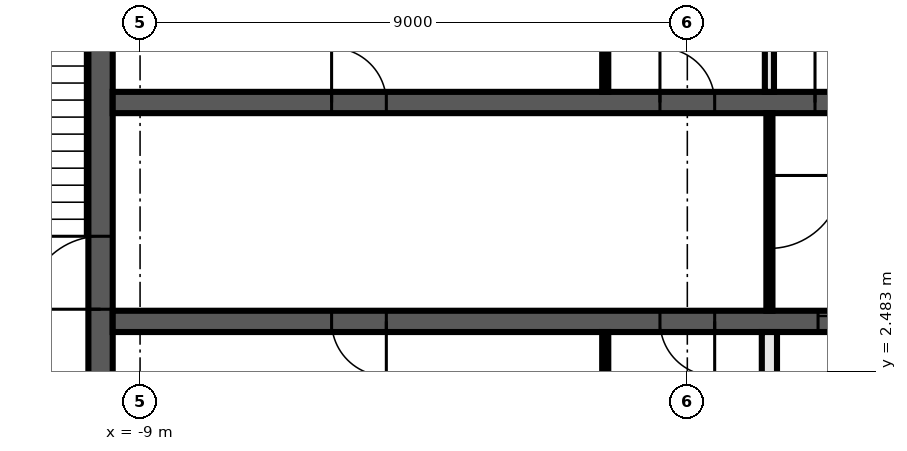
"""IFC4 building model, lengths in metres.
Left out: names, types, materials, properties, quantities, classifications, styles, units other than length and angle.
Written with IfcOpenShell. Run it as: python <this file> out.ifc"""

import sys

from ifc_helpers import new_model, si_unit, direction, frame, frame_2d, origin, place, context, subcontext, project, spatial, rectangle, extrude, element, fill, save


model = new_model("IFC4")
c1 = context("Model", 3, precision=1e-05, world=origin(), true_north=direction((0.0, 1.0)))
c2 = subcontext(c1, "Body", "Model", "MODEL_VIEW")
j1 = project(units=[si_unit("LENGTHUNIT", "METRE"), si_unit("PLANEANGLEUNIT", "RADIAN")], contexts=[c1])
p1 = place(None, origin())
s1 = spatial("IfcSite", under=j1, at=p1, CompositionType="ELEMENT")
p2 = place(p1, origin())
s2 = spatial("IfcBuilding", under=s1, at=p2, CompositionType="ELEMENT")
p3 = place(p2, frame((0.0, 0.0, 171.2)))
s3 = spatial("IfcBuildingStorey", under=s2, at=p3, CompositionType="ELEMENT", Elevation=171.2)
p4 = place(p3, frame((-9.65, 2.3, 0.0), z_axis=(0.0, 0.0, 1.0), x_axis=(0.0, 1.0, 0.0)))
e1 = element("IfcWall", 1, at=p4, inside=s3, PredefinedType="SHEAR", context=c2, shape_type="SweptSolid", body=[
    extrude(rectangle(XDim=7.5, YDim=0.4, at=frame_2d((3.75, 0.0))), origin(), (0.0, 0.0, 1.0), 3.82),
])
p5 = place(p4, frame((1.2, 0.0, 0.0)))
e2 = element("IfcOpeningElement", 2, at=p5, cuts=e1, PredefinedType="OPENING", context=c2, shape_type="SweptSolid", body=[
    extrude(rectangle(XDim=1.2, YDim=2.1, at=frame_2d((0.6, 1.05))), frame((0.0, 0.21, 0.0), z_axis=(0.0, -1.0, 0.0), x_axis=(1.0, 0.0, 0.0)), (0.0, 0.0, 1.0), 0.42),
])
p6 = place(p3, frame((-9.45, 6.9, 0.0), z_axis=(0.0, 0.0, 1.0), x_axis=(1.0, 0.0, 0.0)))
e3 = element("IfcWall", 3, at=p6, inside=s3, PredefinedType="SHEAR", context=c2, shape_type="SweptSolid", body=[
    extrude(rectangle(XDim=18.9, YDim=0.35, at=frame_2d((9.45, 0.0))), origin(), (0.0, 0.0, 1.0), 3.82),
])
p7 = place(p6, frame((11.55, 0.0, 0.0)))
e4 = element("IfcOpeningElement", 4, at=p7, cuts=e3, PredefinedType="OPENING", context=c2, shape_type="SweptSolid", body=[
    extrude(rectangle(XDim=1.2, YDim=2.1, at=frame_2d((0.6, 1.05))), frame((0.0, 0.185, 0.0), z_axis=(0.0, -1.0, 0.0), x_axis=(1.0, 0.0, 0.0)), (0.0, 0.0, 1.0), 0.37),
])
p8 = place(p6, frame((14.3, 0.0, 0.0)))
e5 = element("IfcOpeningElement", 5, at=p8, cuts=e3, PredefinedType="OPENING", context=c2, shape_type="SweptSolid", body=[
    extrude(rectangle(XDim=1.1, YDim=2.1, at=frame_2d((0.55, 1.05))), frame((0.0, 0.185, 0.0), z_axis=(0.0, -1.0, 0.0), x_axis=(1.0, 0.0, 0.0)), (0.0, 0.0, 1.0), 0.37),
])
p9 = place(p6, frame((17.0, 0.0, 0.0)))
e6 = element("IfcOpeningElement", 6, at=p9, cuts=e3, PredefinedType="OPENING", context=c2, shape_type="SweptSolid", body=[
    extrude(rectangle(XDim=1.1, YDim=2.1, at=frame_2d((0.55, 1.05))), frame((0.0, 0.185, 0.0), z_axis=(0.0, -1.0, 0.0), x_axis=(1.0, 0.0, 0.0)), (0.0, 0.0, 1.0), 0.37),
])
p10 = place(p6, frame((3.6, 0.0, 0.0)))
e7 = element("IfcOpeningElement", 7, at=p10, cuts=e3, PredefinedType="OPENING", context=c2, shape_type="SweptSolid", body=[
    extrude(rectangle(XDim=0.9, YDim=2.1, at=frame_2d((0.45, 1.05))), frame((0.0, 0.185, 0.0), z_axis=(0.0, -1.0, 0.0), x_axis=(1.0, 0.0, 0.0)), (0.0, 0.0, 1.0), 0.37),
])
p11 = place(p6, frame((9.0, 0.0, 0.0)))
e8 = element("IfcOpeningElement", 8, at=p11, cuts=e3, PredefinedType="OPENING", context=c2, shape_type="SweptSolid", body=[
    extrude(rectangle(XDim=0.9, YDim=2.1, at=frame_2d((0.45, 1.05))), frame((0.0, 0.185, 0.0), z_axis=(0.0, -1.0, 0.0), x_axis=(1.0, 0.0, 0.0)), (0.0, 0.0, 1.0), 0.37),
])
p12 = place(p3, frame((9.45, 3.3, 0.0), z_axis=(0.0, 0.0, 1.0), x_axis=(-1.0, 0.0, 0.0)))
e9 = element("IfcWall", 9, at=p12, inside=s3, PredefinedType="SHEAR", context=c2, shape_type="SweptSolid", body=[
    extrude(rectangle(XDim=18.9, YDim=0.35, at=frame_2d((9.45, 0.0))), origin(), (0.0, 0.0, 1.0), 3.82),
])
p13 = place(p12, frame((6.2, 0.0, 0.0)))
e10 = element("IfcOpeningElement", 10, at=p13, cuts=e9, PredefinedType="OPENING", context=c2, shape_type="SweptSolid", body=[
    extrude(rectangle(XDim=1.1, YDim=2.1, at=frame_2d((0.55, 1.05))), frame((0.0, 0.185, 0.0), z_axis=(0.0, -1.0, 0.0), x_axis=(1.0, 0.0, 0.0)), (0.0, 0.0, 1.0), 0.37),
])
p14 = place(p12, frame((3.5, 0.0, 0.0)))
e11 = element("IfcOpeningElement", 11, at=p14, cuts=e9, PredefinedType="OPENING", context=c2, shape_type="SweptSolid", body=[
    extrude(rectangle(XDim=1.1, YDim=2.1, at=frame_2d((0.55, 1.05))), frame((0.0, 0.185, 0.0), z_axis=(0.0, -1.0, 0.0), x_axis=(1.0, 0.0, 0.0)), (0.0, 0.0, 1.0), 0.37),
])
p15 = place(p12, frame((0.9, 0.0, 0.0)))
e12 = element("IfcOpeningElement", 12, at=p15, cuts=e9, PredefinedType="OPENING", context=c2, shape_type="SweptSolid", body=[
    extrude(rectangle(XDim=0.9, YDim=2.1, at=frame_2d((0.45, 1.05))), frame((0.0, 0.185, 0.0), z_axis=(0.0, -1.0, 0.0), x_axis=(1.0, 0.0, 0.0)), (0.0, 0.0, 1.0), 0.37),
])
p16 = place(p12, frame((14.4, 0.0, 0.0)))
e13 = element("IfcOpeningElement", 13, at=p16, cuts=e9, PredefinedType="OPENING", context=c2, shape_type="SweptSolid", body=[
    extrude(rectangle(XDim=0.9, YDim=2.1, at=frame_2d((0.45, 1.05))), frame((0.0, 0.185, 0.0), z_axis=(0.0, -1.0, 0.0), x_axis=(1.0, 0.0, 0.0)), (0.0, 0.0, 1.0), 0.37),
])
p17 = place(p12, frame((9.0, 0.0, 0.0)))
e14 = element("IfcOpeningElement", 14, at=p17, cuts=e9, PredefinedType="OPENING", context=c2, shape_type="SweptSolid", body=[
    extrude(rectangle(XDim=0.9, YDim=2.1, at=frame_2d((0.45, 1.05))), frame((0.0, 0.185, 0.0), z_axis=(0.0, -1.0, 0.0), x_axis=(1.0, 0.0, 0.0)), (0.0, 0.0, 1.0), 0.37),
])
p18 = place(p3, frame((1.35, 7.075, 0.0), z_axis=(0.0, 0.0, 1.0), x_axis=(0.0, 1.0, 0.0)))
e15 = element("IfcWall", 15, at=p18, inside=s3, PredefinedType="PARTITIONING", context=c2, shape_type="SweptSolid", body=[
    extrude(rectangle(XDim=2.725, YDim=0.15, at=frame_2d((1.363, 0.0))), origin(), (0.0, 0.0, 1.0), 3.82),
])
p19 = place(p3, frame((1.35, 6.725, 0.0), z_axis=(0.0, 0.0, 1.0), x_axis=(0.0, -1.0, 0.0)))
e16 = element("IfcWall", 16, at=p19, inside=s3, PredefinedType="PARTITIONING", context=c2, shape_type="SweptSolid", body=[
    extrude(rectangle(XDim=3.25, YDim=0.1, at=frame_2d((1.625, 0.0))), origin(), (0.0, 0.0, 1.0), 3.82),
])
p20 = place(p19, frame((1.025, 0.0, 0.0)))
e17 = element("IfcOpeningElement", 17, at=p20, cuts=e16, PredefinedType="OPENING", context=c2, shape_type="SweptSolid", body=[
    extrude(rectangle(XDim=1.2, YDim=2.1, at=frame_2d((0.6, 1.05))), frame((0.0, 0.06, 0.0), z_axis=(0.0, -1.0, 0.0), x_axis=(1.0, 0.0, 0.0)), (0.0, 0.0, 1.0), 0.12),
])
p21 = place(p3, frame((1.35, 0.4, 0.0), z_axis=(0.0, 0.0, 1.0), x_axis=(0.0, 1.0, 0.0)))
e18 = element("IfcWall", 18, at=p21, inside=s3, PredefinedType="SOLIDWALL", context=c2, shape_type="SweptSolid", body=[
    extrude(rectangle(XDim=2.725, YDim=0.25, at=frame_2d((1.363, 0.0))), origin(), (0.0, 0.0, 1.0), 3.82),
])
for number, where, z_axis, x_axis in (
    (19, (-1.35, 0.4, 0.0), (0.0, 0.0, 1.0), (0.0, 1.0, 0.0)),
    (20, (-1.35, 7.075, 0.0), (0.0, 0.0, 1.0), (0.0, 1.0, 0.0)),
):
    element("IfcWall", number, at=place(p3, frame(where, z_axis=z_axis, x_axis=x_axis)), inside=s3, PredefinedType="PARTITIONING", context=c2, shape_type="SweptSolid", body=[
        extrude(rectangle(XDim=2.725, YDim=0.1, at=frame_2d((1.363, 0.0))), origin(), (0.0, 0.0, 1.0), 3.82),
    ])
p22 = place(p7, origin())
e21 = element("IfcDoor", 21, at=p22, inside=s3, OperationType="SINGLE_SWING_LEFT", PredefinedType="DOOR", context=c2, shape_type="SweptSolid", body=[
    extrude(rectangle(XDim=1.2, YDim=2.1, at=frame_2d((0.6, 1.05))), frame((0.0, 0.025, 0.0), z_axis=(0.0, -1.0, 0.0), x_axis=(1.0, 0.0, 0.0)), (0.0, 0.0, 1.0), 0.05),
])
fill(e4, e21)
p23 = place(p13, origin())
e22 = element("IfcDoor", 22, at=p23, inside=s3, OperationType="DOUBLE_DOOR_SLIDING", PredefinedType="DOOR", context=c2, shape_type="SweptSolid", body=[
    extrude(rectangle(XDim=1.1, YDim=2.1, at=frame_2d((0.55, 1.05))), frame((0.0, 0.025, 0.0), z_axis=(0.0, -1.0, 0.0), x_axis=(1.0, 0.0, 0.0)), (0.0, 0.0, 1.0), 0.05),
])
fill(e10, e22)
p24 = place(p10, origin())
e23 = element("IfcDoor", 23, at=p24, inside=s3, OperationType="SINGLE_SWING_RIGHT", PredefinedType="DOOR", context=c2, shape_type="SweptSolid", body=[
    extrude(rectangle(XDim=0.9, YDim=2.1, at=frame_2d((0.45, 1.05))), frame((0.0, 0.025, 0.0), z_axis=(0.0, -1.0, 0.0), x_axis=(1.0, 0.0, 0.0)), (0.0, 0.0, 1.0), 0.05),
])
fill(e7, e23)
p25 = place(p11, origin())
e24 = element("IfcDoor", 24, at=p25, inside=s3, OperationType="SINGLE_SWING_LEFT", PredefinedType="DOOR", context=c2, shape_type="SweptSolid", body=[
    extrude(rectangle(XDim=0.9, YDim=2.1, at=frame_2d((0.45, 1.05))), frame((0.0, 0.025, 0.0), z_axis=(0.0, -1.0, 0.0), x_axis=(1.0, 0.0, 0.0)), (0.0, 0.0, 1.0), 0.05),
])
fill(e8, e24)
p26 = place(p16, origin())
e25 = element("IfcDoor", 25, at=p26, inside=s3, OperationType="SINGLE_SWING_RIGHT", PredefinedType="DOOR", context=c2, shape_type="SweptSolid", body=[
    extrude(rectangle(XDim=0.9, YDim=2.1, at=frame_2d((0.45, 1.05))), frame((0.0, 0.025, 0.0), z_axis=(0.0, -1.0, 0.0), x_axis=(1.0, 0.0, 0.0)), (0.0, 0.0, 1.0), 0.05),
])
fill(e13, e25)
p27 = place(p17, origin())
e26 = element("IfcDoor", 26, at=p27, inside=s3, OperationType="SINGLE_SWING_LEFT", PredefinedType="DOOR", context=c2, shape_type="SweptSolid", body=[
    extrude(rectangle(XDim=0.9, YDim=2.1, at=frame_2d((0.45, 1.05))), frame((0.0, 0.025, 0.0), z_axis=(0.0, -1.0, 0.0), x_axis=(1.0, 0.0, 0.0)), (0.0, 0.0, 1.0), 0.05),
])
fill(e14, e26)
p28 = place(p5, origin())
e27 = element("IfcDoor", 27, at=p28, inside=s3, OperationType="SINGLE_SWING_RIGHT", PredefinedType="DOOR", context=c2, shape_type="SweptSolid", body=[
    extrude(rectangle(XDim=1.2, YDim=2.1, at=frame_2d((0.6, 1.05))), frame((0.0, 0.025, 0.0), z_axis=(0.0, -1.0, 0.0), x_axis=(1.0, 0.0, 0.0)), (0.0, 0.0, 1.0), 0.05),
])
fill(e2, e27)
p29 = place(p20, origin())
e28 = element("IfcDoor", 28, at=p29, inside=s3, OperationType="SINGLE_SWING_LEFT", PredefinedType="DOOR", context=c2, shape_type="SweptSolid", body=[
    extrude(rectangle(XDim=1.2, YDim=2.1, at=frame_2d((0.6, 1.05))), frame((0.0, 0.025, 0.0), z_axis=(0.0, -1.0, 0.0), x_axis=(1.0, 0.0, 0.0)), (0.0, 0.0, 1.0), 0.05),
])
fill(e17, e28)
save(model, sys.argv[1])
